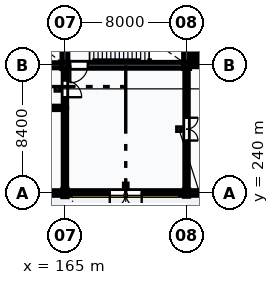
"""IFC4 building model, lengths in metres.
Left out: names, types, materials, properties, quantities, classifications, styles, units other than length and angle.
Written with IfcOpenShell. Run it as: python <this file> out.ifc"""

import sys

from ifc_helpers import new_model, si_unit, direction, frame, frame_2d, origin, origin_2d, place, context, subcontext, project, spatial, rectangle, i_section, extrude, element, fill, save


model = new_model("IFC4")
c1 = context("Model", 3, precision=1e-05, world=origin(), true_north=direction((0.0, 1.0)))
c2 = subcontext(c1, "Body", "Model", "MODEL_VIEW")
j1 = project(units=[si_unit("LENGTHUNIT", "METRE"), si_unit("PLANEANGLEUNIT", "RADIAN")], contexts=[c1])
p1 = place(None, origin())
s1 = spatial("IfcSite", under=j1, at=p1, CompositionType="ELEMENT")
p2 = place(p1, origin())
s2 = spatial("IfcBuilding", under=s1, at=p2, CompositionType="ELEMENT")
p3 = place(p2, origin())
s3 = spatial("IfcBuildingStorey", under=s2, at=p3, CompositionType="ELEMENT", Elevation=0.0)
p4 = place(p3, frame((165.0, 240.0, 0.0), z_axis=(0.0, 0.0, 1.0), x_axis=(1.0, 0.0, 0.0)))
e1 = element("IfcColumn", 1, at=p4, inside=s3, PredefinedType="COLUMN", context=c2, shape_type="SweptSolid", body=[
    extrude(i_section(OverallWidth=0.3, OverallDepth=0.5, WebThickness=0.014, FlangeThickness=0.028, FilletRadius=0.027, at=origin_2d()), origin(), (0.0, 0.0, 1.0), 5.4),
])
p5 = place(p3, frame((165.0, 248.4, 0.0), z_axis=(0.0, 0.0, 1.0), x_axis=(1.0, 0.0, 0.0)))
e2 = element("IfcColumn", 2, at=p5, inside=s3, PredefinedType="COLUMN", context=c2, shape_type="SweptSolid", body=[
    extrude(i_section(OverallWidth=0.418, OverallDepth=0.455, WebThickness=0.042, FlangeThickness=0.068, FilletRadius=0.015, at=origin_2d()), origin(), (0.0, 0.0, 1.0), 5.4),
])
p6 = place(p3, frame((173.0, 240.0, 0.0), z_axis=(0.0, 0.0, 1.0), x_axis=(1.0, 0.0, 0.0)))
e3 = element("IfcColumn", 3, at=p6, inside=s3, PredefinedType="COLUMN", context=c2, shape_type="SweptSolid", body=[
    extrude(i_section(OverallWidth=0.3, OverallDepth=0.45, WebThickness=0.014, FlangeThickness=0.026, FilletRadius=0.027, at=origin_2d()), origin(), (0.0, 0.0, 1.0), 5.4),
])
p7 = place(p3, frame((173.0, 248.4, 0.0), z_axis=(0.0, 0.0, 1.0), x_axis=(1.0, 0.0, 0.0)))
e4 = element("IfcColumn", 4, at=p7, inside=s3, PredefinedType="COLUMN", context=c2, shape_type="SweptSolid", body=[
    extrude(i_section(OverallWidth=0.412, OverallDepth=0.435, WebThickness=0.036, FlangeThickness=0.057, FilletRadius=0.015, at=origin_2d()), origin(), (0.0, 0.0, 1.0), 5.4),
])
p8 = place(p3, frame((157.506, 240.0, 0.0), z_axis=(0.0, 0.0, 1.0), x_axis=(1.0, 0.0, 0.0)))
e5 = element("IfcWall", 5, at=p8, inside=s3, PredefinedType="SOLIDWALL", context=c2, shape_type="SweptSolid", body=[
    extrude(rectangle(XDim=7.488, YDim=0.32, at=frame_2d((3.744, 0.0))), origin(), (0.0, 0.0, 1.0), 4.878),
])
p9 = place(p8, frame((2.844, 0.0, 0.95)))
e6 = element("IfcOpeningElement", 6, at=p9, cuts=e5, PredefinedType="OPENING", context=c2, shape_type="SweptSolid", body=[
    extrude(rectangle(XDim=1.8, YDim=2.6, at=frame_2d((0.9, 1.3))), frame((0.0, 0.175, 0.0), z_axis=(0.0, -1.0, 0.0), x_axis=(1.0, 0.0, 0.0)), (0.0, 0.0, 1.0), 0.35),
])
p10 = place(p3, frame((165.006, 240.0, 0.0), z_axis=(0.0, 0.0, 1.0), x_axis=(1.0, 0.0, 0.0)))
e7 = element("IfcWall", 7, at=p10, inside=s3, PredefinedType="SOLIDWALL", context=c2, shape_type="SweptSolid", body=[
    extrude(rectangle(XDim=7.988, YDim=0.32, at=frame_2d((3.994, 0.0))), origin(), (0.0, 0.0, 1.0), 4.838),
])
p11 = place(p10, frame((2.944, 0.0, 0.0)))
e8 = element("IfcOpeningElement", 8, at=p11, cuts=e7, PredefinedType="OPENING", context=c2, shape_type="SweptSolid", body=[
    extrude(rectangle(XDim=2.1, YDim=2.7, at=frame_2d((1.05, 1.35))), frame((0.0, 0.175, 0.0), z_axis=(0.0, -1.0, 0.0), x_axis=(1.0, 0.0, 0.0)), (0.0, 0.0, 1.0), 0.35),
])
p12 = place(p3, frame((173.006, 240.0, 0.0), z_axis=(0.0, 0.0, 1.0), x_axis=(1.0, 0.0, 0.0)))
e9 = element("IfcWall", 9, at=p12, inside=s3, PredefinedType="SOLIDWALL", context=c2, shape_type="SweptSolid", body=[
    extrude(rectangle(XDim=7.988, YDim=0.32, at=frame_2d((3.994, 0.0))), origin(), (0.0, 0.0, 1.0), 4.838),
])
p13 = place(p12, frame((2.944, 0.0, 0.0)))
e10 = element("IfcOpeningElement", 10, at=p13, cuts=e9, PredefinedType="OPENING", context=c2, shape_type="SweptSolid", body=[
    extrude(rectangle(XDim=2.1, YDim=2.7, at=frame_2d((1.05, 1.35))), frame((0.0, 0.175, 0.0), z_axis=(0.0, -1.0, 0.0), x_axis=(1.0, 0.0, 0.0)), (0.0, 0.0, 1.0), 0.35),
])
p14 = place(p3, frame((120.1, 240.1, 5.4), z_axis=(0.0, 0.0, 1.0), x_axis=(1.0, 0.0, 0.0)))
e11 = element("IfcWall", 11, at=p14, inside=s3, PredefinedType="PARAPET", context=c2, shape_type="SweptSolid", body=[
    extrude(rectangle(XDim=167.8, YDim=0.18, at=frame_2d((83.9, 0.0))), origin(), (0.0, 0.0, 1.0), 1.2),
])
p15 = place(p3, frame((165.0, 248.4, 0.0), z_axis=(0.0, 0.0, 1.0), x_axis=(1.0, 0.0, 0.0)))
e12 = element("IfcWall", 12, at=p15, inside=s3, PredefinedType="SHEAR", context=c2, shape_type="SweptSolid", body=[
    extrude(rectangle(XDim=8.0, YDim=0.4, at=frame_2d((4.0, 0.0))), origin(), (0.0, 0.0, 1.0), 5.14),
])
p16 = place(p15, frame((0.35, 0.0, 0.0)))
e13 = element("IfcOpeningElement", 13, at=p16, cuts=e12, PredefinedType="OPENING", context=c2, shape_type="SweptSolid", body=[
    extrude(rectangle(XDim=1.15, YDim=2.15, at=frame_2d((0.575, 1.075))), frame((0.0, 0.215, 0.0), z_axis=(0.0, -1.0, 0.0), x_axis=(1.0, 0.0, 0.0)), (0.0, 0.0, 1.0), 0.43),
])
for number, where, z_axis, x_axis in (
    (14, (165.0, 248.4, 0.0), (0.0, 0.0, 1.0), (0.0, 1.0, 0.0)),
    (15, (173.0, 248.4, 0.0), (0.0, 0.0, 1.0), (0.0, 1.0, 0.0)),
):
    element("IfcWall", number, at=place(p3, frame(where, z_axis=z_axis, x_axis=x_axis)), inside=s3, PredefinedType="SHEAR", context=c2, shape_type="SweptSolid", body=[
        extrude(rectangle(XDim=6.8, YDim=0.4, at=frame_2d((3.4, 0.0))), origin(), (0.0, 0.0, 1.0), 5.14),
    ])
p17 = place(p3, frame((157.5, 248.4, 0.0), z_axis=(0.0, 0.0, 1.0), x_axis=(1.0, 0.0, 0.0)))
e16 = element("IfcWall", 16, at=p17, inside=s3, PredefinedType="SHEAR", context=c2, shape_type="SweptSolid", body=[
    extrude(rectangle(XDim=7.5, YDim=0.35, at=frame_2d((3.75, 0.0))), origin(), (0.0, 0.0, 1.0), 5.14),
])
p18 = place(p17, frame((0.325, 0.0, 0.0)))
e17 = element("IfcOpeningElement", 17, at=p18, cuts=e16, PredefinedType="OPENING", context=c2, shape_type="SweptSolid", body=[
    extrude(rectangle(XDim=1.15, YDim=2.15, at=frame_2d((0.575, 1.075))), frame((0.0, 0.19, 0.0), z_axis=(0.0, -1.0, 0.0), x_axis=(1.0, 0.0, 0.0)), (0.0, 0.0, 1.0), 0.38),
])
p19 = place(p3, frame((173.5, 248.65, 0.0), z_axis=(0.0, 0.0, 1.0), x_axis=(1.0, 0.0, 0.0)))
e18 = element("IfcWall", 18, at=p19, inside=s3, PredefinedType="SHEAR", context=c2, shape_type="SweptSolid", body=[
    extrude(rectangle(XDim=2.2, YDim=0.22, at=frame_2d((1.1, 0.0))), origin(), (0.0, 0.0, 1.0), 5.14),
])
p20 = place(p3, frame((173.5, 248.65, 0.0), z_axis=(0.0, 0.0, 1.0), x_axis=(0.0, 1.0, 0.0)))
e19 = element("IfcWall", 19, at=p20, inside=s3, PredefinedType="SHEAR", context=c2, shape_type="SweptSolid", body=[
    extrude(rectangle(XDim=2.7, YDim=0.22, at=frame_2d((1.35, 0.0))), origin(), (0.0, 0.0, 1.0), 5.14),
])
p21 = place(p3, frame((157.5, 245.6, 0.0), z_axis=(0.0, 0.0, 1.0), x_axis=(1.0, 0.0, 0.0)))
e20 = element("IfcWall", 20, at=p21, inside=s3, PredefinedType="PARTITIONING", context=c2, shape_type="SweptSolid", body=[
    extrude(rectangle(XDim=7.5, YDim=0.24, at=frame_2d((3.75, 0.0))), origin(), (0.0, 0.0, 1.0), 5.15),
])
p22 = place(p3, frame((165.0, 240.0, 0.0), z_axis=(0.0, 0.0, 1.0), x_axis=(0.0, 1.0, 0.0)))
e21 = element("IfcWall", 21, at=p22, inside=s3, PredefinedType="PARTITIONING", context=c2, shape_type="SweptSolid", body=[
    extrude(rectangle(XDim=5.6, YDim=0.24, at=frame_2d((2.8, 0.0))), origin(), (0.0, 0.0, 1.0), 4.688),
])
p23 = place(p3, frame((165.0, 245.6, 0.0), z_axis=(0.0, 0.0, 1.0), x_axis=(0.0, 1.0, 0.0)))
e22 = element("IfcWall", 22, at=p23, inside=s3, PredefinedType="PARTITIONING", context=c2, shape_type="SweptSolid", body=[
    extrude(rectangle(XDim=2.8, YDim=0.24, at=frame_2d((1.4, 0.0))), origin(), (0.0, 0.0, 1.0), 4.688),
])
p24 = place(p23, frame((0.7, 0.0, 0.0)))
e23 = element("IfcOpeningElement", 23, at=p24, cuts=e22, PredefinedType="OPENING", context=c2, shape_type="SweptSolid", body=[
    extrude(rectangle(XDim=1.1, YDim=2.1, at=frame_2d((0.55, 1.05))), frame((0.0, 0.135, 0.0), z_axis=(0.0, -1.0, 0.0), x_axis=(1.0, 0.0, 0.0)), (0.0, 0.0, 1.0), 0.27),
])
p25 = place(p3, frame((173.0, 240.0, 0.0), z_axis=(0.0, 0.0, 1.0), x_axis=(0.0, 1.0, 0.0)))
e24 = element("IfcWall", 24, at=p25, inside=s3, PredefinedType="PARTITIONING", context=c2, shape_type="SweptSolid", body=[
    extrude(rectangle(XDim=8.4, YDim=0.24, at=frame_2d((4.2, 0.0))), origin(), (0.0, 0.0, 1.0), 4.688),
])
p26 = place(p25, frame((3.45, 0.0, 0.0)))
e25 = element("IfcOpeningElement", 25, at=p26, cuts=e24, PredefinedType="OPENING", context=c2, shape_type="SweptSolid", body=[
    extrude(rectangle(XDim=1.5, YDim=2.1, at=frame_2d((0.75, 1.05))), frame((0.0, 0.135, 0.0), z_axis=(0.0, -1.0, 0.0), x_axis=(1.0, 0.0, 0.0)), (0.0, 0.0, 1.0), 0.27),
])
p27 = place(p3, frame((173.0, 248.4, 0.0), z_axis=(0.0, 0.0, 1.0), x_axis=(1.0, 0.0, 0.0)))
e26 = element("IfcWall", 26, at=p27, inside=s3, PredefinedType="PARTITIONING", context=c2, shape_type="SweptSolid", body=[
    extrude(rectangle(XDim=8.0, YDim=0.2, at=frame_2d((4.0, 0.0))), origin(), (0.0, 0.0, 1.0), 4.638),
])
p28 = place(p11, frame((2.1, 0.0, 0.0), z_axis=(0.0, 0.0, 1.0), x_axis=(-1.0, 0.0, 0.0)))
e27 = element("IfcDoor", 27, at=p28, inside=s3, OperationType="DOUBLE_DOOR_SINGLE_SWING", PredefinedType="DOOR", context=c2, shape_type="SweptSolid", body=[
    extrude(rectangle(XDim=2.1, YDim=2.7, at=frame_2d((1.05, 1.35))), frame((0.0, 0.025, 0.0), z_axis=(0.0, -1.0, 0.0), x_axis=(1.0, 0.0, 0.0)), (0.0, 0.0, 1.0), 0.05),
])
fill(e8, e27)
p29 = place(p16, frame((1.15, 0.0, 0.0), z_axis=(0.0, 0.0, 1.0), x_axis=(-1.0, 0.0, 0.0)))
e28 = element("IfcDoor", 28, at=p29, inside=s3, OperationType="SINGLE_SWING_RIGHT", PredefinedType="DOOR", context=c2, shape_type="SweptSolid", body=[
    extrude(rectangle(XDim=1.15, YDim=2.15, at=frame_2d((0.575, 1.075))), frame((0.0, 0.025, 0.0), z_axis=(0.0, -1.0, 0.0), x_axis=(1.0, 0.0, 0.0)), (0.0, 0.0, 1.0), 0.05),
])
fill(e13, e28)
p30 = place(p24, frame((1.1, 0.0, 0.0), z_axis=(0.0, 0.0, 1.0), x_axis=(-1.0, 0.0, 0.0)))
e29 = element("IfcDoor", 29, at=p30, inside=s3, OperationType="SINGLE_SWING_RIGHT", PredefinedType="DOOR", context=c2, shape_type="SweptSolid", body=[
    extrude(rectangle(XDim=1.1, YDim=2.1, at=frame_2d((0.55, 1.05))), frame((0.0, 0.025, 0.0), z_axis=(0.0, -1.0, 0.0), x_axis=(1.0, 0.0, 0.0)), (0.0, 0.0, 1.0), 0.05),
])
fill(e23, e29)
p31 = place(p26, frame((1.5, 0.0, 0.0), z_axis=(0.0, 0.0, 1.0), x_axis=(-1.0, 0.0, 0.0)))
e30 = element("IfcDoor", 30, at=p31, inside=s3, OperationType="DOUBLE_DOOR_SINGLE_SWING", PredefinedType="DOOR", context=c2, shape_type="SweptSolid", body=[
    extrude(rectangle(XDim=1.5, YDim=2.1, at=frame_2d((0.75, 1.05))), frame((0.0, 0.025, 0.0), z_axis=(0.0, -1.0, 0.0), x_axis=(1.0, 0.0, 0.0)), (0.0, 0.0, 1.0), 0.05),
])
fill(e25, e30)
save(model, sys.argv[1])
